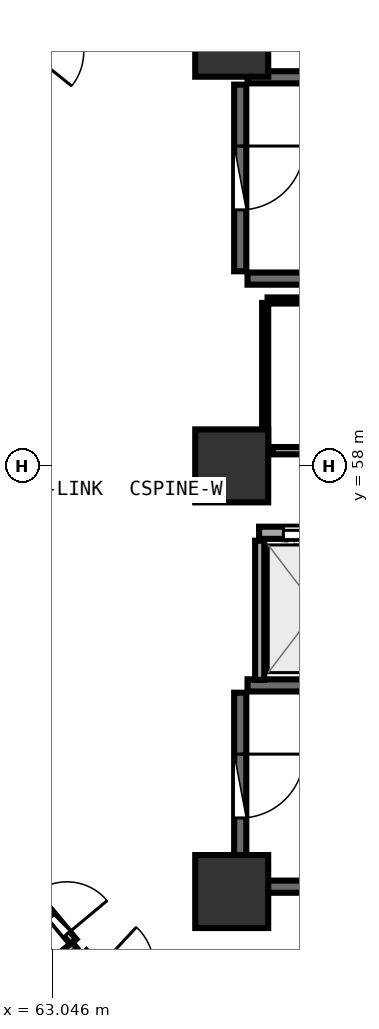
"""IFC4 building model, lengths in metres.
Left out: names, types, materials, properties, quantities, classifications, styles, units other than length and angle.
Written with IfcOpenShell. Run it as: python <this file> out.ifc"""

import sys

from ifc_helpers import new_model, si_unit, direction, frame, frame_2d, origin, origin_2d, place, context, subcontext, project, spatial, rectangle, extrude, element, fill, save


model = new_model("IFC4")
c1 = context("Model", 3, precision=1e-05, world=origin(), true_north=direction((0.0, 1.0)))
c2 = subcontext(c1, "Body", "Model", "MODEL_VIEW")
j1 = project(units=[si_unit("LENGTHUNIT", "METRE"), si_unit("PLANEANGLEUNIT", "RADIAN")], contexts=[c1])
p1 = place(None, origin())
s1 = spatial("IfcSite", under=j1, at=p1, CompositionType="ELEMENT")
p2 = place(p1, origin())
s2 = spatial("IfcBuilding", under=s1, at=p2, CompositionType="ELEMENT")
p3 = place(p2, frame((0.0, 0.0, 204.45)))
s3 = spatial("IfcBuildingStorey", under=s2, at=p3, CompositionType="ELEMENT", Elevation=204.45)
for number, where, z_axis, x_axis in (
    (1, (66.0, 51.0, 0.0), (0.0, 0.0, 1.0), (1.0, 0.0, 0.0)),
    (2, (66.0, 65.0, 0.0), (0.0, 0.0, 1.0), (1.0, 0.0, 0.0)),
    (3, (66.0, 58.0, 0.0), (0.0, 0.0, 1.0), (1.0, 0.0, 0.0)),
):
    element("IfcColumn", number, at=place(p3, frame(where, z_axis=z_axis, x_axis=x_axis)), inside=s3, PredefinedType="PILASTER", context=c2, shape_type="SweptSolid", body=[
        extrude(rectangle(XDim=1.2, YDim=1.2, at=origin_2d()), origin(), (0.0, 0.0, 1.0), 3.75),
    ])
for number, where, z_axis, x_axis in (
    (4, (66.26, 61.08, 0.0), (0.0, 0.0, 1.0), (1.0, 0.0, 0.0)),
    (5, (73.42, 64.39, 0.0), (0.0, 0.0, 1.0), (-1.0, 0.0, 0.0)),
):
    element("IfcWall", number, at=place(p3, frame(where, z_axis=z_axis, x_axis=x_axis)), inside=s3, PredefinedType="SHEAR", context=c2, shape_type="SweptSolid", body=[
        extrude(rectangle(XDim=7.16, YDim=0.2, at=frame_2d((3.58, 0.0))), origin(), (0.0, 0.0, 1.0), 3.49),
    ])
p4 = place(p3, frame((66.14, 64.27, 0.0), z_axis=(0.0, 0.0, 1.0), x_axis=(0.0, -1.0, 0.0)))
e6 = element("IfcWall", 6, at=p4, inside=s3, PredefinedType="SHEAR", context=c2, shape_type="SweptSolid", body=[
    extrude(rectangle(XDim=3.07, YDim=0.2, at=frame_2d((1.535, 0.0))), origin(), (0.0, 0.0, 1.0), 3.49),
])
p5 = place(p4, frame((1.01, 0.0, 0.0)))
e7 = element("IfcOpeningElement", 7, at=p5, cuts=e6, PredefinedType="OPENING", context=c2, shape_type="SweptSolid", body=[
    extrude(rectangle(XDim=1.05, YDim=2.1, at=frame_2d((0.525, 1.05))), frame((0.0, 0.11, 0.0), z_axis=(0.0, -1.0, 0.0), x_axis=(1.0, 0.0, 0.0)), (0.0, 0.0, 1.0), 0.22),
])
for number, where, z_axis, x_axis in (
    (8, (66.26, 51.08, 0.0), (0.0, 0.0, 1.0), (1.0, 0.0, 0.0)),
    (9, (73.42, 54.39, 0.0), (0.0, 0.0, 1.0), (-1.0, 0.0, 0.0)),
):
    element("IfcWall", number, at=place(p3, frame(where, z_axis=z_axis, x_axis=x_axis)), inside=s3, PredefinedType="SHEAR", context=c2, shape_type="SweptSolid", body=[
        extrude(rectangle(XDim=7.16, YDim=0.2, at=frame_2d((3.58, 0.0))), origin(), (0.0, 0.0, 1.0), 3.49),
    ])
p6 = place(p3, frame((66.14, 54.27, 0.0), z_axis=(0.0, 0.0, 1.0), x_axis=(0.0, -1.0, 0.0)))
e10 = element("IfcWall", 10, at=p6, inside=s3, PredefinedType="SHEAR", context=c2, shape_type="SweptSolid", body=[
    extrude(rectangle(XDim=3.07, YDim=0.2, at=frame_2d((1.535, 0.0))), origin(), (0.0, 0.0, 1.0), 3.49),
])
p7 = place(p6, frame((1.01, 0.0, 0.0)))
e11 = element("IfcOpeningElement", 11, at=p7, cuts=e10, PredefinedType="OPENING", context=c2, shape_type="SweptSolid", body=[
    extrude(rectangle(XDim=1.05, YDim=2.1, at=frame_2d((0.525, 1.05))), frame((0.0, 0.11, 0.0), z_axis=(0.0, -1.0, 0.0), x_axis=(1.0, 0.0, 0.0)), (0.0, 0.0, 1.0), 0.22),
])
p8 = place(p3, frame((66.45, 56.9, 0.0), z_axis=(0.0, 0.0, 1.0), x_axis=(1.0, 0.0, 0.0)))
e12 = element("IfcWall", 12, at=p8, inside=s3, PredefinedType="SOLIDWALL", context=c2, shape_type="SweptSolid", body=[
    extrude(rectangle(XDim=14.4, YDim=0.2, at=frame_2d((7.2, 0.0))), origin(), (0.0, 0.0, 1.0), 3.48),
])
p9 = place(p8, frame((0.4, 0.0, 0.0)))
e13 = element("IfcOpeningElement", 13, at=p9, cuts=e12, PredefinedType="OPENING", context=c2, shape_type="SweptSolid", body=[
    extrude(rectangle(XDim=1.1, YDim=2.1, at=frame_2d((0.55, 1.05))), frame((0.0, 0.11, 0.0), z_axis=(0.0, -1.0, 0.0), x_axis=(1.0, 0.0, 0.0)), (0.0, 0.0, 1.0), 0.22),
])
p10 = place(p8, frame((2.4, 0.0, 0.0)))
e14 = element("IfcOpeningElement", 14, at=p10, cuts=e12, PredefinedType="OPENING", context=c2, shape_type="SweptSolid", body=[
    extrude(rectangle(XDim=1.1, YDim=2.1, at=frame_2d((0.55, 1.05))), frame((0.0, 0.11, 0.0), z_axis=(0.0, -1.0, 0.0), x_axis=(1.0, 0.0, 0.0)), (0.0, 0.0, 1.0), 0.22),
])
p11 = place(p8, frame((4.4, 0.0, 0.0)))
e15 = element("IfcOpeningElement", 15, at=p11, cuts=e12, PredefinedType="OPENING", context=c2, shape_type="SweptSolid", body=[
    extrude(rectangle(XDim=1.1, YDim=2.1, at=frame_2d((0.55, 1.05))), frame((0.0, 0.11, 0.0), z_axis=(0.0, -1.0, 0.0), x_axis=(1.0, 0.0, 0.0)), (0.0, 0.0, 1.0), 0.22),
])
p12 = place(p3, frame((66.46, 54.48, 0.0), z_axis=(0.0, 0.0, 1.0), x_axis=(0.0, 1.0, 0.0)))
e16 = element("IfcWall", 16, at=p12, inside=s3, PredefinedType="PARTITIONING", context=c2, shape_type="SweptSolid", body=[
    extrude(rectangle(XDim=2.29, YDim=0.15, at=frame_2d((1.145, 0.0))), origin(), (0.0, 0.0, 1.0), 3.48),
])
p13 = place(p3, frame((66.675, 58.25, 0.0), z_axis=(0.0, 0.0, 1.0), x_axis=(1.0, 0.0, 0.0)))
e17 = element("IfcWall", 17, at=p13, inside=s3, PredefinedType="PARTITIONING", context=c2, shape_type="SweptSolid", body=[
    extrude(rectangle(XDim=5.715, YDim=0.12, at=frame_2d((2.857, 0.0))), origin(), (0.0, 0.0, 1.0), 3.48),
])
p14 = place(p13, frame((2.407, 0.0, 0.0)))
e18 = element("IfcOpeningElement", 18, at=p14, cuts=e17, PredefinedType="OPENING", context=c2, shape_type="SweptSolid", body=[
    extrude(rectangle(XDim=0.9, YDim=2.08, at=frame_2d((0.45, 1.04))), frame((0.0, 0.07, 0.0), z_axis=(0.0, -1.0, 0.0), x_axis=(1.0, 0.0, 0.0)), (0.0, 0.0, 1.0), 0.14),
])
p15 = place(p3, frame((63.885, 66.327, 0.0), z_axis=(0.0, 0.0, 1.0), x_axis=(-0.626276824741, -0.779600756023, 0.0)))
e19 = element("IfcWall", 19, at=p15, inside=s3, PredefinedType="PARTITIONING", context=c2, shape_type="SweptSolid", body=[
    extrude(rectangle(XDim=2.99, YDim=0.12, at=frame_2d((1.495, 0.0))), origin(), (0.0, 0.0, 1.0), 3.025),
])
p16 = place(p15, frame((1.045, 0.0, 0.0)))
e20 = element("IfcOpeningElement", 20, at=p16, cuts=e19, PredefinedType="OPENING", context=c2, shape_type="SweptSolid", body=[
    extrude(rectangle(XDim=0.9, YDim=2.08, at=frame_2d((0.45, 1.04))), frame((0.0, 0.07, 0.0), z_axis=(0.0, -1.0, 0.0), x_axis=(1.0, 0.0, 0.0)), (0.0, 0.0, 1.0), 0.14),
])
p17 = place(p3, frame((62.635, 51.086, 0.0), z_axis=(0.0, 0.0, 1.0), x_axis=(0.639759255057, -0.768575367526, 0.0)))
e21 = element("IfcWall", 21, at=p17, inside=s3, PredefinedType="PLUMBINGWALL", context=c2, shape_type="SweptSolid", body=[
    extrude(rectangle(XDim=1.187, YDim=0.13, at=frame_2d((0.593, 0.0))), origin(), (0.0, 0.0, 1.0), 3.025),
])
p18 = place(p17, frame((0.163, 0.0, 0.0)))
e22 = element("IfcOpeningElement", 22, at=p18, cuts=e21, PredefinedType="OPENING", context=c2, shape_type="SweptSolid", body=[
    extrude(rectangle(XDim=0.86, YDim=2.05, at=frame_2d((0.43, 1.025))), frame((0.0, 0.075, 0.0), z_axis=(0.0, -1.0, 0.0), x_axis=(1.0, 0.0, 0.0)), (0.0, 0.0, 1.0), 0.15),
])
p19 = place(p3, frame((72.41, 60.72, 0.0), z_axis=(0.0, 0.0, 1.0), x_axis=(-1.0, 0.0, 0.0)))
e23 = element("IfcWall", 23, at=p19, inside=s3, PredefinedType="PARTITIONING", context=c2, shape_type="SweptSolid", body=[
    extrude(rectangle(XDim=5.82, YDim=0.1, at=frame_2d((2.91, 0.0))), origin(), (0.0, 0.0, 1.0), 3.48),
])
p20 = place(p3, frame((66.55, 60.68, 0.0), z_axis=(0.0, 0.0, 1.0), x_axis=(0.0, -1.0, 0.0)))
e24 = element("IfcWall", 24, at=p20, inside=s3, PredefinedType="PARTITIONING", context=c2, shape_type="SweptSolid", body=[
    extrude(rectangle(XDim=2.383, YDim=0.1, at=frame_2d((1.191, 0.0))), origin(), (0.0, 0.0, 1.0), 3.48),
])
p21 = place(p3, frame((63.417, 50.115, 0.0), z_axis=(0.0, 0.0, 1.0), x_axis=(-0.76963081868, -0.638489156477, 0.0)))
e25 = element("IfcWall", 25, at=p21, inside=s3, PredefinedType="PLUMBINGWALL", context=c2, shape_type="SweptSolid", body=[
    extrude(rectangle(XDim=3.36, YDim=0.13, at=frame_2d((1.68, 0.0))), origin(), (0.0, 0.0, 1.0), 3.175),
])
p22 = place(p5, origin())
e26 = element("IfcDoor", 26, at=p22, inside=s3, OperationType="SINGLE_SWING_LEFT", PredefinedType="DOOR", context=c2, shape_type="SweptSolid", body=[
    extrude(rectangle(XDim=1.05, YDim=2.1, at=frame_2d((0.525, 1.05))), frame((0.0, 0.025, 0.0), z_axis=(0.0, -1.0, 0.0), x_axis=(1.0, 0.0, 0.0)), (0.0, 0.0, 1.0), 0.05),
])
fill(e7, e26)
p23 = place(p7, origin())
e27 = element("IfcDoor", 27, at=p23, inside=s3, OperationType="SINGLE_SWING_LEFT", PredefinedType="DOOR", context=c2, shape_type="SweptSolid", body=[
    extrude(rectangle(XDim=1.05, YDim=2.1, at=frame_2d((0.525, 1.05))), frame((0.0, 0.025, 0.0), z_axis=(0.0, -1.0, 0.0), x_axis=(1.0, 0.0, 0.0)), (0.0, 0.0, 1.0), 0.05),
])
fill(e11, e27)
p24 = place(p9, origin())
e28 = element("IfcDoor", 28, at=p24, inside=s3, OperationType="DOUBLE_DOOR_SLIDING", PredefinedType="DOOR", context=c2, shape_type="SweptSolid", body=[
    extrude(rectangle(XDim=1.1, YDim=2.1, at=frame_2d((0.55, 1.05))), frame((0.0, 0.025, 0.0), z_axis=(0.0, -1.0, 0.0), x_axis=(1.0, 0.0, 0.0)), (0.0, 0.0, 1.0), 0.05),
])
fill(e13, e28)
p25 = place(p16, origin())
e29 = element("IfcDoor", 29, at=p25, inside=s3, OperationType="SINGLE_SWING_RIGHT", PredefinedType="DOOR", context=c2, shape_type="SweptSolid", body=[
    extrude(rectangle(XDim=0.9, YDim=2.08, at=frame_2d((0.45, 1.04))), frame((0.0, 0.025, 0.0), z_axis=(0.0, -1.0, 0.0), x_axis=(1.0, 0.0, 0.0)), (0.0, 0.0, 1.0), 0.05),
])
fill(e20, e29)
p26 = place(p18, origin())
e30 = element("IfcDoor", 30, at=p26, inside=s3, OperationType="SINGLE_SWING_RIGHT", PredefinedType="DOOR", context=c2, shape_type="SweptSolid", body=[
    extrude(rectangle(XDim=0.86, YDim=2.05, at=frame_2d((0.43, 1.025))), frame((0.0, 0.025, 0.0), z_axis=(0.0, -1.0, 0.0), x_axis=(1.0, 0.0, 0.0)), (0.0, 0.0, 1.0), 0.05),
])
fill(e22, e30)
save(model, sys.argv[1])
